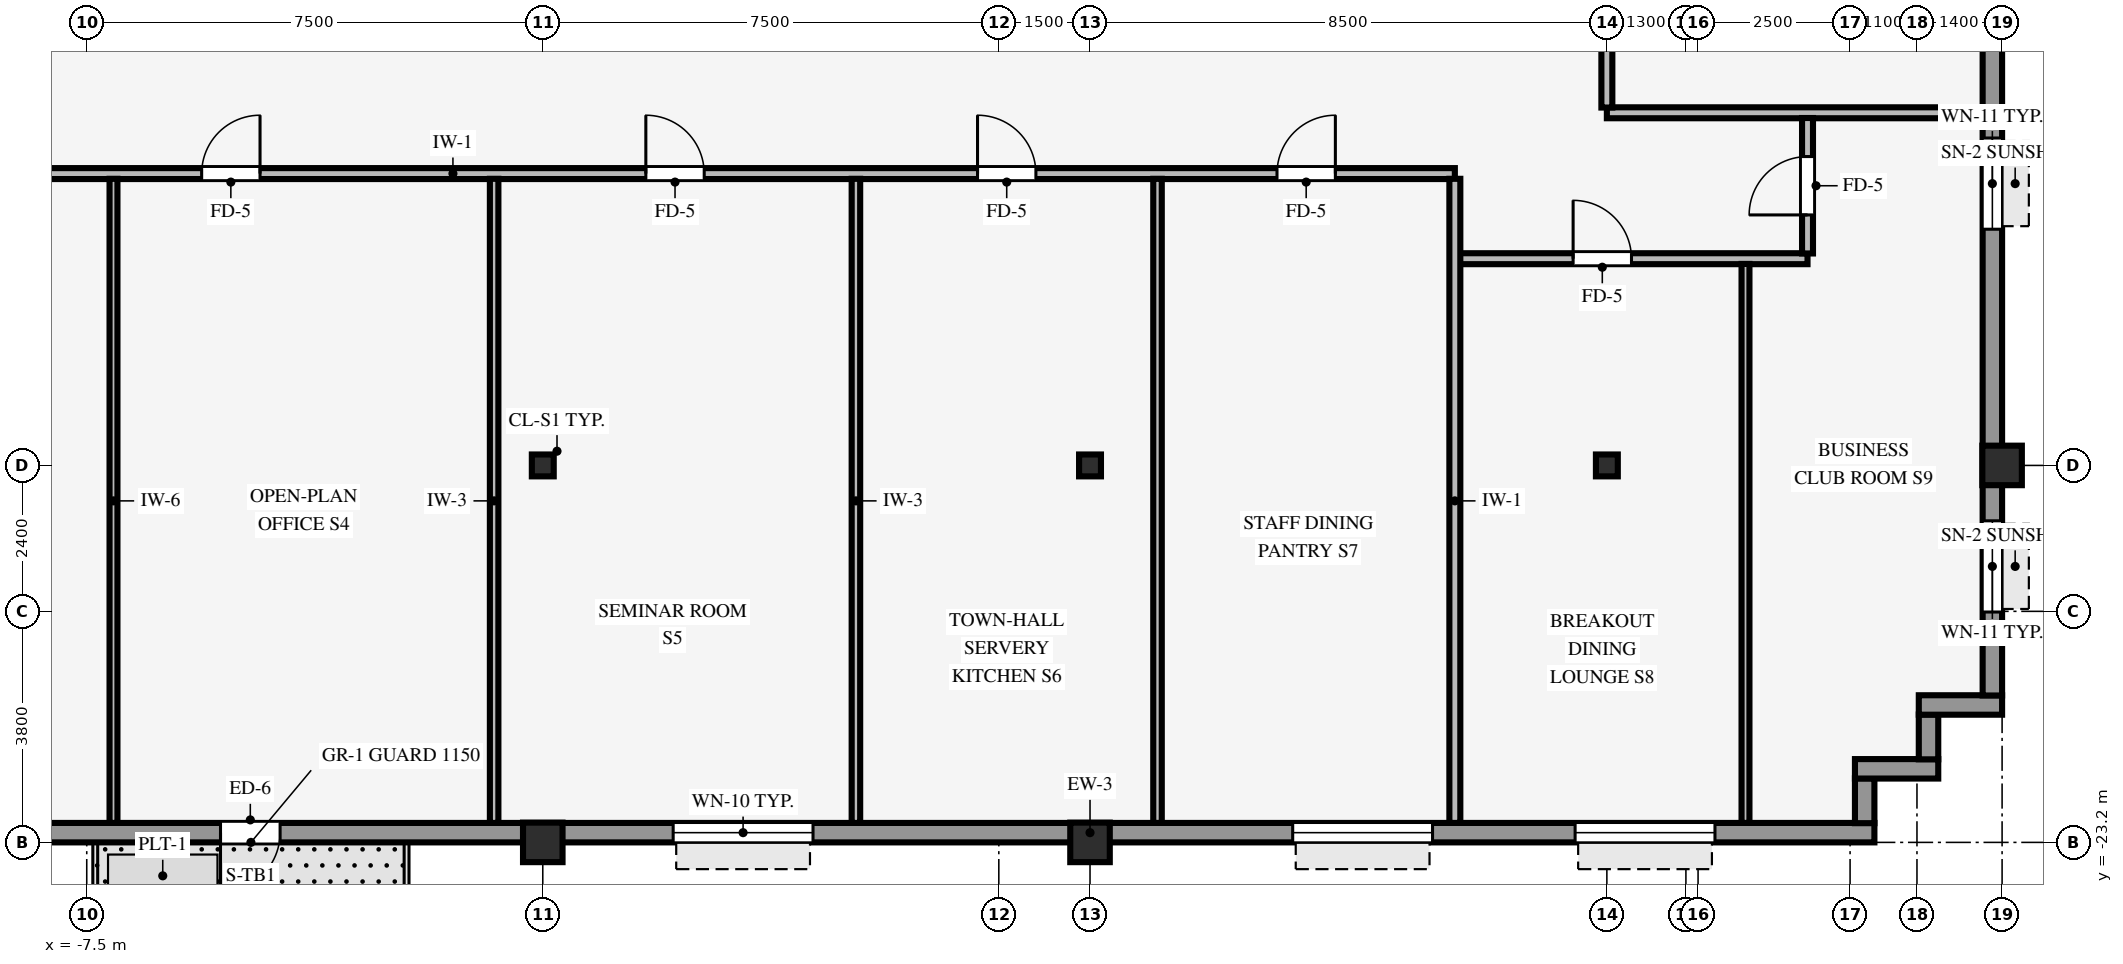
"""IFC4 building model, lengths in metres.
Left out: names, types, materials, properties, quantities, classifications, styles, units other than length and angle.
Written with IfcOpenShell. Run it as: python <this file> out.ifc"""

import sys

from ifc_helpers import new_model, si_unit, direction, frame, frame_2d, origin, origin_2d, place, context, subcontext, project, spatial, rectangle, hollow_rectangle, i_section, extrude, source, transform, mapped, element, fill, save


model = new_model("IFC4")
c1 = context("Model", 3, precision=1e-05, world=origin(), true_north=direction((0.0, 1.0)))
c2 = subcontext(c1, "Body", "Model", "MODEL_VIEW")
j1 = project(units=[si_unit("LENGTHUNIT", "METRE"), si_unit("PLANEANGLEUNIT", "RADIAN")], contexts=[c1])
p1 = place(None, origin())
s1 = spatial("IfcSite", under=j1, at=p1, CompositionType="ELEMENT")
p2 = place(p1, origin())
s2 = spatial("IfcBuilding", under=s1, at=p2, CompositionType="ELEMENT")
p3 = place(p2, frame((0.0, 0.0, 101.95)))
s3 = spatial("IfcBuildingStorey", under=s2, at=p3, CompositionType="ELEMENT", Elevation=101.95)
for number, where, z_axis, x_axis in (
    (1, (24.0, -17.0, 0.0), (0.0, 0.0, 1.0), (1.0, 0.0, 0.0)),
    (2, (0.0, -23.2, 0.0), (0.0, 0.0, 1.0), (1.0, 0.0, 0.0)),
    (3, (9.0, -23.2, 0.0), (0.0, 0.0, 1.0), (1.0, 0.0, 0.0)),
):
    element("IfcColumn", number, at=place(p3, frame(where, z_axis=z_axis, x_axis=x_axis)), inside=s3, PredefinedType="COLUMN", context=c2, shape_type="SweptSolid", body=[
        extrude(hollow_rectangle(XDim=0.65, YDim=0.65, WallThickness=0.04, InnerFilletRadius=0.04, OuterFilletRadius=0.08, at=origin_2d()), origin(), (0.0, 0.0, 1.0), 3.37),
    ])
for number, where, z_axis, x_axis in (
    (4, (0.0, -17.0, 0.0), (0.0, 0.0, 1.0), (1.0, 0.0, 0.0)),
    (5, (9.0, -17.0, 0.0), (0.0, 0.0, 1.0), (1.0, 0.0, 0.0)),
    (6, (17.5, -17.0, 0.0), (0.0, 0.0, 1.0), (1.0, 0.0, 0.0)),
):
    element("IfcColumn", number, at=place(p3, frame(where, z_axis=z_axis, x_axis=x_axis)), inside=s3, PredefinedType="COLUMN", context=c2, shape_type="SweptSolid", body=[
        extrude(i_section(OverallWidth=0.36, OverallDepth=0.36, WebThickness=0.021, FlangeThickness=0.021, FilletRadius=0.018, at=origin_2d()), origin(), (0.0, 0.0, 1.0), 3.37),
    ])
p4 = place(p3, frame((-21.9, -23.04, 0.0), z_axis=(0.0, 0.0, 1.0), x_axis=(1.0, 0.0, 0.0)))
e7 = element("IfcWall", 7, at=p4, inside=s3, PredefinedType="STANDARD", context=c2, shape_type="SweptSolid", body=[
    extrude(rectangle(XDim=43.8, YDim=0.32, at=frame_2d((21.9, 0.0))), origin(), (0.0, 0.0, 1.0), 2.705),
])
p5 = place(p4, frame((17.58, 0.0, 0.0), z_axis=(0.0, 0.0, 1.0), x_axis=(-1.0, 0.0, 0.0)))
e8 = element("IfcOpeningElement", 8, at=p5, cuts=e7, PredefinedType="OPENING", context=c2, shape_type="SweptSolid", body=[
    extrude(rectangle(XDim=0.98, YDim=2.15, at=frame_2d((0.49, 1.075))), frame((0.0, 0.17, 0.0), z_axis=(0.0, -1.0, 0.0), x_axis=(1.0, 0.0, 0.0)), (0.0, 0.0, 1.0), 0.34),
])
p6 = place(p4, frame((2.622, 0.0, 0.8)))
e9 = element("IfcOpeningElement", 9, at=p6, cuts=e7, PredefinedType="OPENING", context=c2, shape_type="SweptSolid", body=[
    extrude(rectangle(XDim=2.3, YDim=1.62, at=frame_2d((1.15, 0.81))), frame((0.0, 0.17, 0.0), z_axis=(0.0, -1.0, 0.0), x_axis=(1.0, 0.0, 0.0)), (0.0, 0.0, 1.0), 0.34),
])
p7 = place(p4, frame((8.167, 0.0, 0.8)))
e10 = element("IfcOpeningElement", 10, at=p7, cuts=e7, PredefinedType="OPENING", context=c2, shape_type="SweptSolid", body=[
    extrude(rectangle(XDim=2.3, YDim=1.62, at=frame_2d((1.15, 0.81))), frame((0.0, 0.17, 0.0), z_axis=(0.0, -1.0, 0.0), x_axis=(1.0, 0.0, 0.0)), (0.0, 0.0, 1.0), 0.34),
])
p8 = place(p4, frame((24.044, 0.0, 0.8)))
e11 = element("IfcOpeningElement", 11, at=p8, cuts=e7, PredefinedType="OPENING", context=c2, shape_type="SweptSolid", body=[
    extrude(rectangle(XDim=2.3, YDim=1.62, at=frame_2d((1.15, 0.81))), frame((0.0, 0.17, 0.0), z_axis=(0.0, -1.0, 0.0), x_axis=(1.0, 0.0, 0.0)), (0.0, 0.0, 1.0), 0.34),
])
p9 = place(p4, frame((34.233, 0.0, 0.8)))
e12 = element("IfcOpeningElement", 12, at=p9, cuts=e7, PredefinedType="OPENING", context=c2, shape_type="SweptSolid", body=[
    extrude(rectangle(XDim=2.3, YDim=1.62, at=frame_2d((1.15, 0.81))), frame((0.0, 0.17, 0.0), z_axis=(0.0, -1.0, 0.0), x_axis=(1.0, 0.0, 0.0)), (0.0, 0.0, 1.0), 0.34),
])
p10 = place(p4, frame((38.878, 0.0, 0.8)))
e13 = element("IfcOpeningElement", 13, at=p10, cuts=e7, PredefinedType="OPENING", context=c2, shape_type="SweptSolid", body=[
    extrude(rectangle(XDim=2.3, YDim=1.62, at=frame_2d((1.15, 0.81))), frame((0.0, 0.17, 0.0), z_axis=(0.0, -1.0, 0.0), x_axis=(1.0, 0.0, 0.0)), (0.0, 0.0, 1.0), 0.34),
])
p11 = place(p3, frame((21.74, -22.884, 0.0), z_axis=(0.0, 0.0, 1.0), x_axis=(0.0, 1.0, 0.0)))
e14 = element("IfcWall", 14, at=p11, inside=s3, PredefinedType="STANDARD", context=c2, shape_type="SweptSolid", body=[
    extrude(rectangle(XDim=0.738, YDim=0.32, at=frame_2d((0.369, 0.0))), origin(), (0.0, 0.0, 1.0), 3.36),
])
p12 = place(p3, frame((21.58, -21.99, 0.0), z_axis=(0.0, 0.0, 1.0), x_axis=(1.0, 0.0, 0.0)))
e15 = element("IfcWall", 15, at=p12, inside=s3, PredefinedType="STANDARD", context=c2, shape_type="SweptSolid", body=[
    extrude(rectangle(XDim=1.37, YDim=0.32, at=frame_2d((0.685, 0.0))), origin(), (0.0, 0.0, 1.0), 3.36),
])
p13 = place(p3, frame((22.79, -21.834, 0.0), z_axis=(0.0, 0.0, 1.0), x_axis=(0.0, 1.0, 0.0)))
e16 = element("IfcWall", 16, at=p13, inside=s3, PredefinedType="STANDARD", context=c2, shape_type="SweptSolid", body=[
    extrude(rectangle(XDim=0.738, YDim=0.32, at=frame_2d((0.369, 0.0))), origin(), (0.0, 0.0, 1.0), 3.36),
])
p14 = place(p3, frame((22.63, -20.94, 0.0), z_axis=(0.0, 0.0, 1.0), x_axis=(1.0, 0.0, 0.0)))
e17 = element("IfcWall", 17, at=p14, inside=s3, PredefinedType="STANDARD", context=c2, shape_type="SweptSolid", body=[
    extrude(rectangle(XDim=1.37, YDim=0.32, at=frame_2d((0.685, 0.0))), origin(), (0.0, 0.0, 1.0), 3.36),
])
p15 = place(p3, frame((23.84, -20.784, 0.0), z_axis=(0.0, 0.0, 1.0), x_axis=(0.0, 1.0, 0.0)))
e18 = element("IfcWall", 18, at=p15, inside=s3, PredefinedType="STANDARD", context=c2, shape_type="SweptSolid", body=[
    extrude(rectangle(XDim=41.568, YDim=0.32, at=frame_2d((20.784, 0.0))), origin(), (0.0, 0.0, 1.0), 2.705),
])
p16 = place(p15, frame((1.373, 0.0, 0.8)))
e19 = element("IfcOpeningElement", 19, at=p16, cuts=e18, PredefinedType="OPENING", context=c2, shape_type="SweptSolid", body=[
    extrude(rectangle(XDim=1.5, YDim=1.6, at=frame_2d((0.75, 0.8))), frame((0.0, 0.17, 0.0), z_axis=(0.0, -1.0, 0.0), x_axis=(1.0, 0.0, 0.0)), (0.0, 0.0, 1.0), 0.34),
])
p17 = place(p15, frame((7.669, 0.0, 0.8)))
e20 = element("IfcOpeningElement", 20, at=p17, cuts=e18, PredefinedType="OPENING", context=c2, shape_type="SweptSolid", body=[
    extrude(rectangle(XDim=1.5, YDim=1.6, at=frame_2d((0.75, 0.8))), frame((0.0, 0.17, 0.0), z_axis=(0.0, -1.0, 0.0), x_axis=(1.0, 0.0, 0.0)), (0.0, 0.0, 1.0), 0.34),
])
p18 = place(p15, frame((12.615, 0.0, 0.8)))
e21 = element("IfcOpeningElement", 21, at=p18, cuts=e18, PredefinedType="OPENING", context=c2, shape_type="SweptSolid", body=[
    extrude(rectangle(XDim=1.5, YDim=1.6, at=frame_2d((0.75, 0.8))), frame((0.0, 0.17, 0.0), z_axis=(0.0, -1.0, 0.0), x_axis=(1.0, 0.0, 0.0)), (0.0, 0.0, 1.0), 0.34),
])
p19 = place(p15, frame((17.561, 0.0, 0.8)))
e22 = element("IfcOpeningElement", 22, at=p19, cuts=e18, PredefinedType="OPENING", context=c2, shape_type="SweptSolid", body=[
    extrude(rectangle(XDim=1.5, YDim=1.6, at=frame_2d((0.75, 0.8))), frame((0.0, 0.17, 0.0), z_axis=(0.0, -1.0, 0.0), x_axis=(1.0, 0.0, 0.0)), (0.0, 0.0, 1.0), 0.34),
])
p20 = place(p15, frame((22.507, 0.0, 0.8)))
e23 = element("IfcOpeningElement", 23, at=p20, cuts=e18, PredefinedType="OPENING", context=c2, shape_type="SweptSolid", body=[
    extrude(rectangle(XDim=1.5, YDim=1.6, at=frame_2d((0.75, 0.8))), frame((0.0, 0.17, 0.0), z_axis=(0.0, -1.0, 0.0), x_axis=(1.0, 0.0, 0.0)), (0.0, 0.0, 1.0), 0.34),
])
p21 = place(p15, frame((27.453, 0.0, 0.8)))
e24 = element("IfcOpeningElement", 24, at=p21, cuts=e18, PredefinedType="OPENING", context=c2, shape_type="SweptSolid", body=[
    extrude(rectangle(XDim=1.5, YDim=1.6, at=frame_2d((0.75, 0.8))), frame((0.0, 0.17, 0.0), z_axis=(0.0, -1.0, 0.0), x_axis=(1.0, 0.0, 0.0)), (0.0, 0.0, 1.0), 0.34),
])
p22 = place(p15, frame((32.399, 0.0, 0.8)))
e25 = element("IfcOpeningElement", 25, at=p22, cuts=e18, PredefinedType="OPENING", context=c2, shape_type="SweptSolid", body=[
    extrude(rectangle(XDim=1.5, YDim=1.6, at=frame_2d((0.75, 0.8))), frame((0.0, 0.17, 0.0), z_axis=(0.0, -1.0, 0.0), x_axis=(1.0, 0.0, 0.0)), (0.0, 0.0, 1.0), 0.34),
])
p23 = place(p15, frame((38.695, 0.0, 0.8)))
e26 = element("IfcOpeningElement", 26, at=p23, cuts=e18, PredefinedType="OPENING", context=c2, shape_type="SweptSolid", body=[
    extrude(rectangle(XDim=1.5, YDim=1.6, at=frame_2d((0.75, 0.8))), frame((0.0, 0.17, 0.0), z_axis=(0.0, -1.0, 0.0), x_axis=(1.0, 0.0, 0.0)), (0.0, 0.0, 1.0), 0.34),
])
p24 = place(p3, frame((15.07, -13.6, 0.0), z_axis=(0.0, 0.0, 1.0), x_axis=(1.0, 0.0, 0.0)))
e27 = element("IfcWall", 27, at=p24, inside=s3, PredefinedType="PARTITIONING", context=c2, shape_type="SweptSolid", body=[
    extrude(rectangle(XDim=5.73, YDim=0.18, at=frame_2d((2.865, 0.0))), origin(), (0.0, 0.0, 1.0), 2.998),
])
p25 = place(p24, frame((1.875, 0.0, 0.0)))
e28 = element("IfcOpeningElement", 28, at=p25, cuts=e27, PredefinedType="OPENING", context=c2, shape_type="SweptSolid", body=[
    extrude(rectangle(XDim=0.96, YDim=2.1, at=frame_2d((0.48, 1.05))), frame((0.0, 0.1, 0.0), z_axis=(0.0, -1.0, 0.0), x_axis=(1.0, 0.0, 0.0)), (0.0, 0.0, 1.0), 0.2),
])
p26 = place(p3, frame((-15.0, -12.2, 0.0), z_axis=(0.0, 0.0, 1.0), x_axis=(1.0, 0.0, 0.0)))
e29 = element("IfcWall", 29, at=p26, inside=s3, PredefinedType="PARTITIONING", context=c2, shape_type="SweptSolid", body=[
    extrude(rectangle(XDim=30.0, YDim=0.18, at=frame_2d((15.0, 0.0))), origin(), (0.0, 0.0, 1.0), 3.36),
])
p27 = place(p26, frame((3.98, 0.0, 0.0)))
e30 = element("IfcOpeningElement", 30, at=p27, cuts=e29, PredefinedType="OPENING", context=c2, shape_type="SweptSolid", body=[
    extrude(rectangle(XDim=0.96, YDim=2.1, at=frame_2d((0.48, 1.05))), frame((0.0, 0.1, 0.0), z_axis=(0.0, -1.0, 0.0), x_axis=(1.0, 0.0, 0.0)), (0.0, 0.0, 1.0), 0.2),
])
p28 = place(p26, frame((16.695, 0.0, 0.0)))
e31 = element("IfcOpeningElement", 31, at=p28, cuts=e29, PredefinedType="OPENING", context=c2, shape_type="SweptSolid", body=[
    extrude(rectangle(XDim=0.96, YDim=2.1, at=frame_2d((0.48, 1.05))), frame((0.0, 0.1, 0.0), z_axis=(0.0, -1.0, 0.0), x_axis=(1.0, 0.0, 0.0)), (0.0, 0.0, 1.0), 0.2),
])
p29 = place(p26, frame((22.15, 0.0, 0.0)))
e32 = element("IfcOpeningElement", 32, at=p29, cuts=e29, PredefinedType="OPENING", context=c2, shape_type="SweptSolid", body=[
    extrude(rectangle(XDim=0.96, YDim=2.1, at=frame_2d((0.48, 1.05))), frame((0.0, 0.1, 0.0), z_axis=(0.0, -1.0, 0.0), x_axis=(1.0, 0.0, 0.0)), (0.0, 0.0, 1.0), 0.2),
])
p30 = place(p26, frame((27.075, 0.0, 0.0)))
e33 = element("IfcOpeningElement", 33, at=p30, cuts=e29, PredefinedType="OPENING", context=c2, shape_type="SweptSolid", body=[
    extrude(rectangle(XDim=0.96, YDim=2.1, at=frame_2d((0.48, 1.05))), frame((0.0, 0.1, 0.0), z_axis=(0.0, -1.0, 0.0), x_axis=(1.0, 0.0, 0.0)), (0.0, 0.0, 1.0), 0.2),
])
p31 = place(p26, frame((9.39, 0.0, 0.0)))
e34 = element("IfcOpeningElement", 34, at=p31, cuts=e29, PredefinedType="OPENING", context=c2, shape_type="SweptSolid", body=[
    extrude(rectangle(XDim=0.96, YDim=2.1, at=frame_2d((0.48, 1.05))), frame((0.0, 0.1, 0.0), z_axis=(0.0, -1.0, 0.0), x_axis=(1.0, 0.0, 0.0)), (0.0, 0.0, 1.0), 0.2),
])
p32 = place(p3, frame((17.5, -11.2, 0.0), z_axis=(0.0, 0.0, 1.0), x_axis=(1.0, 0.0, 0.0)))
e35 = element("IfcWall", 35, at=p32, inside=s3, PredefinedType="PARTITIONING", context=c2, shape_type="SweptSolid", body=[
    extrude(rectangle(XDim=6.18, YDim=0.18, at=frame_2d((3.09, 0.0))), origin(), (0.0, 0.0, 1.0), 3.36),
])
p33 = place(p3, frame((-7.06, -22.88, 0.0), z_axis=(0.0, 0.0, 1.0), x_axis=(0.0, 1.0, 0.0)))
e36 = element("IfcWall", 36, at=p33, inside=s3, PredefinedType="PARTITIONING", context=c2, shape_type="SweptSolid", body=[
    extrude(rectangle(XDim=10.594, YDim=0.13, at=frame_2d((5.297, 0.0))), origin(), (0.0, 0.0, 1.0), 3.36),
])
for number, where, z_axis, x_axis in (
    (37, (-0.8, -22.88, 0.0), (0.0, 0.0, 1.0), (0.0, 1.0, 0.0)),
    (38, (5.15, -22.88, 0.0), (0.0, 0.0, 1.0), (0.0, 1.0, 0.0)),
    (39, (10.11, -22.88, 0.0), (0.0, 0.0, 1.0), (0.0, 1.0, 0.0)),
):
    element("IfcWall", number, at=place(p3, frame(where, z_axis=z_axis, x_axis=x_axis)), inside=s3, PredefinedType="PARTITIONING", context=c2, shape_type="SweptSolid", body=[
        extrude(rectangle(XDim=10.594, YDim=0.14, at=frame_2d((5.297, 0.0))), origin(), (0.0, 0.0, 1.0), 3.36),
    ])
p34 = place(p3, frame((15.0, -22.88, 0.0), z_axis=(0.0, 0.0, 1.0), x_axis=(0.0, 1.0, 0.0)))
e40 = element("IfcWall", 40, at=p34, inside=s3, PredefinedType="PARTITIONING", context=c2, shape_type="SweptSolid", body=[
    extrude(rectangle(XDim=10.594, YDim=0.18, at=frame_2d((5.297, 0.0))), origin(), (0.0, 0.0, 1.0), 3.36),
])
p35 = place(p3, frame((17.5, -11.114, 0.0), z_axis=(0.0, 0.0, 1.0), x_axis=(0.0, 1.0, 0.0)))
e41 = element("IfcWall", 41, at=p35, inside=s3, PredefinedType="PARTITIONING", context=c2, shape_type="SweptSolid", body=[
    extrude(rectangle(XDim=0.968, YDim=0.18, at=frame_2d((0.484, 0.0))), origin(), (0.0, 0.0, 1.0), 2.738),
])
p36 = place(p3, frame((19.78, -22.88, 0.0), z_axis=(0.0, 0.0, 1.0), x_axis=(0.0, 1.0, 0.0)))
e42 = element("IfcWall", 42, at=p36, inside=s3, PredefinedType="PARTITIONING", context=c2, shape_type="SweptSolid", body=[
    extrude(rectangle(XDim=9.194, YDim=0.13, at=frame_2d((4.597, 0.0))), origin(), (0.0, 0.0, 1.0), 3.36),
])
p37 = place(p3, frame((20.8, -13.514, 0.0), z_axis=(0.0, 0.0, 1.0), x_axis=(0.0, 1.0, 0.0)))
e43 = element("IfcWall", 43, at=p37, inside=s3, PredefinedType="PARTITIONING", context=c2, shape_type="SweptSolid", body=[
    extrude(rectangle(XDim=2.228, YDim=0.18, at=frame_2d((1.114, 0.0))), origin(), (0.0, 0.0, 1.0), 3.36),
])
p38 = place(p37, frame((0.634, 0.0, 0.0)))
e44 = element("IfcOpeningElement", 44, at=p38, cuts=e43, PredefinedType="OPENING", context=c2, shape_type="SweptSolid", body=[
    extrude(rectangle(XDim=0.96, YDim=2.1, at=frame_2d((0.48, 1.05))), frame((0.0, 0.1, 0.0), z_axis=(0.0, -1.0, 0.0), x_axis=(1.0, 0.0, 0.0)), (0.0, 0.0, 1.0), 0.2),
])
m1 = source(origin(), c2, "Body", "SweptSolid", [
    extrude(rectangle(XDim=0.98, YDim=2.15, at=frame_2d((0.49, 1.075))), frame((0.0, 0.025, 0.0), z_axis=(0.0, -1.0, 0.0), x_axis=(1.0, 0.0, 0.0)), (0.0, 0.0, 1.0), 0.05),
])
p39 = place(p5, origin())
e45 = element("IfcDoor", 45, at=p39, inside=s3, OperationType="SINGLE_SWING_RIGHT", PredefinedType="DOOR", context=c2, shape_type="MappedRepresentation", body=[
    mapped(m1, transform((0.0, 0.0, 0.0), scale=1.0)),
])
fill(e8, e45)
m2 = source(origin(), c2, "Body", "SweptSolid", [
    extrude(rectangle(XDim=2.3, YDim=1.62, at=frame_2d((1.15, 0.81))), frame((0.0, 0.03, 0.0), z_axis=(0.0, -1.0, 0.0), x_axis=(1.0, 0.0, 0.0)), (0.0, 0.0, 1.0), 0.06),
])
p40 = place(p8, origin())
e46 = element("IfcWindow", 46, at=p40, inside=s3, PartitioningType="SINGLE_PANEL", PredefinedType="WINDOW", context=c2, shape_type="MappedRepresentation", body=[
    mapped(m2, transform((0.0, 0.0, 0.0), scale=1.0)),
])
fill(e11, e46)
p41 = place(p9, origin())
e47 = element("IfcWindow", 47, at=p41, inside=s3, PartitioningType="SINGLE_PANEL", PredefinedType="WINDOW", context=c2, shape_type="MappedRepresentation", body=[
    mapped(m2, transform((0.0, 0.0, 0.0), scale=1.0)),
])
fill(e12, e47)
p42 = place(p10, origin())
e48 = element("IfcWindow", 48, at=p42, inside=s3, PartitioningType="SINGLE_PANEL", PredefinedType="WINDOW", context=c2, shape_type="MappedRepresentation", body=[
    mapped(m2, transform((0.0, 0.0, 0.0), scale=1.0)),
])
fill(e13, e48)
m3 = source(origin(), c2, "Body", "SweptSolid", [
    extrude(rectangle(XDim=1.5, YDim=1.6, at=frame_2d((0.75, 0.8))), frame((0.0, 0.03, 0.0), z_axis=(0.0, -1.0, 0.0), x_axis=(1.0, 0.0, 0.0)), (0.0, 0.0, 1.0), 0.06),
])
p43 = place(p16, origin())
e49 = element("IfcWindow", 49, at=p43, inside=s3, PartitioningType="SINGLE_PANEL", PredefinedType="WINDOW", context=c2, shape_type="MappedRepresentation", body=[
    mapped(m3, transform((0.0, 0.0, 0.0), scale=1.0)),
])
fill(e19, e49)
p44 = place(p17, origin())
e50 = element("IfcWindow", 50, at=p44, inside=s3, PartitioningType="SINGLE_PANEL", PredefinedType="WINDOW", context=c2, shape_type="MappedRepresentation", body=[
    mapped(m3, transform((0.0, 0.0, 0.0), scale=1.0)),
])
fill(e20, e50)
m4 = source(origin(), c2, "Body", "SweptSolid", [
    extrude(rectangle(XDim=0.96, YDim=2.1, at=frame_2d((0.48, 1.05))), frame((0.0, 0.025, 0.0), z_axis=(0.0, -1.0, 0.0), x_axis=(1.0, 0.0, 0.0)), (0.0, 0.0, 1.0), 0.05),
])
p45 = place(p28, origin())
e51 = element("IfcDoor", 51, at=p45, inside=s3, OperationType="SINGLE_SWING_LEFT", PredefinedType="DOOR", context=c2, shape_type="MappedRepresentation", body=[
    mapped(m4, transform((0.0, 0.0, 0.0), scale=1.0)),
])
fill(e31, e51)
p46 = place(p29, origin())
e52 = element("IfcDoor", 52, at=p46, inside=s3, OperationType="SINGLE_SWING_LEFT", PredefinedType="DOOR", context=c2, shape_type="MappedRepresentation", body=[
    mapped(m4, transform((0.0, 0.0, 0.0), scale=1.0)),
])
fill(e32, e52)
p47 = place(p30, origin())
e53 = element("IfcDoor", 53, at=p47, inside=s3, OperationType="SINGLE_SWING_RIGHT", PredefinedType="DOOR", context=c2, shape_type="MappedRepresentation", body=[
    mapped(m4, transform((0.0, 0.0, 0.0), scale=1.0)),
])
fill(e33, e53)
p48 = place(p25, origin())
e54 = element("IfcDoor", 54, at=p48, inside=s3, OperationType="SINGLE_SWING_LEFT", PredefinedType="DOOR", context=c2, shape_type="MappedRepresentation", body=[
    mapped(m4, transform((0.0, 0.0, 0.0), scale=1.0)),
])
fill(e28, e54)
p49 = place(p31, origin())
e55 = element("IfcDoor", 55, at=p49, inside=s3, OperationType="SINGLE_SWING_RIGHT", PredefinedType="DOOR", context=c2, shape_type="MappedRepresentation", body=[
    mapped(m4, transform((0.0, 0.0, 0.0), scale=1.0)),
])
fill(e34, e55)
p50 = place(p38, origin())
e56 = element("IfcDoor", 56, at=p50, inside=s3, OperationType="SINGLE_SWING_LEFT", PredefinedType="DOOR", context=c2, shape_type="MappedRepresentation", body=[
    mapped(m4, transform((0.0, 0.0, 0.0), scale=1.0)),
])
fill(e44, e56)
save(model, sys.argv[1])
